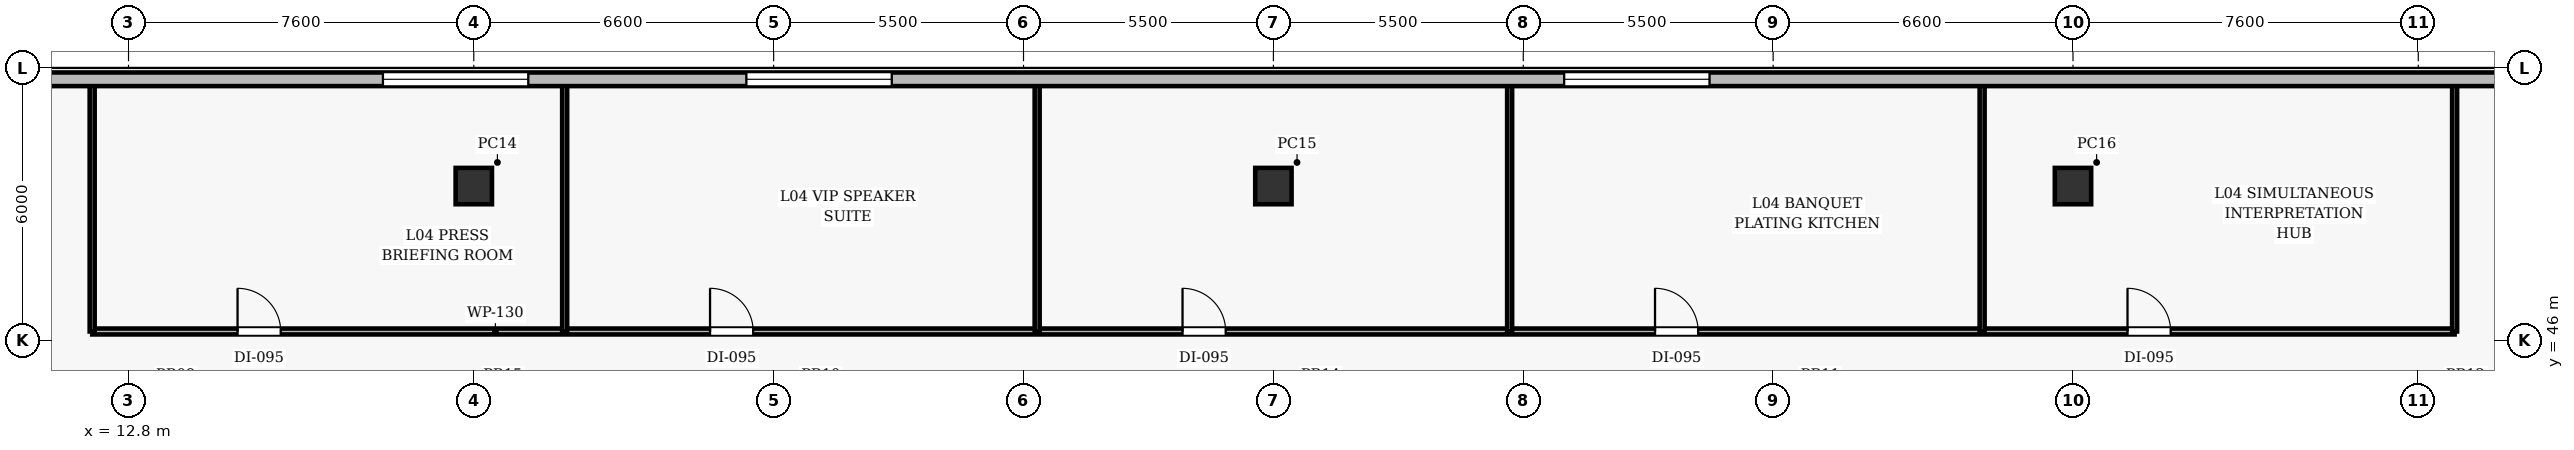
"""IFC4 building model, lengths in metres.
Left out: names, types, materials, properties, quantities, classifications, styles, units other than length and angle.
Written with IfcOpenShell. Run it as: python <this file> out.ifc"""

import sys

from ifc_helpers import new_model, si_unit, direction, frame, frame_2d, origin, origin_2d, place, context, subcontext, project, spatial, rectangle, extrude, element, fill, save


model = new_model("IFC4")
c1 = context("Model", 3, precision=1e-05, world=origin(), true_north=direction((0.0, 1.0)))
c2 = subcontext(c1, "Body", "Model", "MODEL_VIEW")
j1 = project(units=[si_unit("LENGTHUNIT", "METRE"), si_unit("PLANEANGLEUNIT", "RADIAN")], contexts=[c1])
p1 = place(None, origin())
s1 = spatial("IfcSite", under=j1, at=p1, CompositionType="ELEMENT")
p2 = place(p1, origin())
s2 = spatial("IfcBuilding", under=s1, at=p2, CompositionType="ELEMENT")
p3 = place(p2, frame((0.0, 0.0, 24.0)))
s3 = spatial("IfcBuildingStorey", under=s2, at=p3, CompositionType="ELEMENT", Elevation=24.0)
for number, where, z_axis, x_axis in (
    (1, (20.4, 49.4, 0.0), (0.0, 0.0, 1.0), (1.0, 0.0, 0.0)),
    (2, (38.0, 49.4, 0.0), (0.0, 0.0, 1.0), (1.0, 0.0, 0.0)),
    (3, (55.6, 49.4, 0.0), (0.0, 0.0, 1.0), (1.0, 0.0, 0.0)),
):
    element("IfcColumn", number, at=place(p3, frame(where, z_axis=z_axis, x_axis=x_axis)), inside=s3, PredefinedType="COLUMN", context=c2, shape_type="SweptSolid", body=[
        extrude(rectangle(XDim=0.8, YDim=0.8, at=origin_2d()), origin(), (0.0, 0.0, 1.0), 6.0),
    ])
p4 = place(p3, frame((12.0, 46.2, 0.0), z_axis=(0.0, 0.0, 1.0), x_axis=(1.0, 0.0, 0.0)))
e4 = element("IfcWall", 4, at=p4, inside=s3, PredefinedType="PARTITIONING", context=c2, shape_type="SweptSolid", body=[
    extrude(rectangle(XDim=52.0, YDim=0.13, at=frame_2d((26.0, 0.0))), origin(), (0.0, 0.0, 1.0), 4.71),
])
p5 = place(p4, frame((3.2, 0.0, 0.0)))
e5 = element("IfcOpeningElement", 5, at=p5, cuts=e4, PredefinedType="OPENING", context=c2, shape_type="SweptSolid", body=[
    extrude(rectangle(XDim=0.95, YDim=2.15, at=frame_2d((0.475, 1.075))), frame((0.0, 0.075, 0.0), z_axis=(0.0, -1.0, 0.0), x_axis=(1.0, 0.0, 0.0)), (0.0, 0.0, 1.0), 0.15),
])
p6 = place(p4, frame((13.6, 0.0, 0.0)))
e6 = element("IfcOpeningElement", 6, at=p6, cuts=e4, PredefinedType="OPENING", context=c2, shape_type="SweptSolid", body=[
    extrude(rectangle(XDim=0.95, YDim=2.15, at=frame_2d((0.475, 1.075))), frame((0.0, 0.075, 0.0), z_axis=(0.0, -1.0, 0.0), x_axis=(1.0, 0.0, 0.0)), (0.0, 0.0, 1.0), 0.15),
])
p7 = place(p4, frame((24.0, 0.0, 0.0)))
e7 = element("IfcOpeningElement", 7, at=p7, cuts=e4, PredefinedType="OPENING", context=c2, shape_type="SweptSolid", body=[
    extrude(rectangle(XDim=0.95, YDim=2.15, at=frame_2d((0.475, 1.075))), frame((0.0, 0.075, 0.0), z_axis=(0.0, -1.0, 0.0), x_axis=(1.0, 0.0, 0.0)), (0.0, 0.0, 1.0), 0.15),
])
p8 = place(p4, frame((34.4, 0.0, 0.0)))
e8 = element("IfcOpeningElement", 8, at=p8, cuts=e4, PredefinedType="OPENING", context=c2, shape_type="SweptSolid", body=[
    extrude(rectangle(XDim=0.95, YDim=2.15, at=frame_2d((0.475, 1.075))), frame((0.0, 0.075, 0.0), z_axis=(0.0, -1.0, 0.0), x_axis=(1.0, 0.0, 0.0)), (0.0, 0.0, 1.0), 0.15),
])
p9 = place(p4, frame((44.8, 0.0, 0.0)))
e9 = element("IfcOpeningElement", 9, at=p9, cuts=e4, PredefinedType="OPENING", context=c2, shape_type="SweptSolid", body=[
    extrude(rectangle(XDim=0.95, YDim=2.15, at=frame_2d((0.475, 1.075))), frame((0.0, 0.075, 0.0), z_axis=(0.0, -1.0, 0.0), x_axis=(1.0, 0.0, 0.0)), (0.0, 0.0, 1.0), 0.15),
])
for number, where, z_axis, x_axis in (
    (10, (12.0, 46.2, 0.0), (0.0, 0.0, 1.0), (0.0, 1.0, 0.0)),
    (11, (22.4, 46.2, 0.0), (0.0, 0.0, 1.0), (0.0, 1.0, 0.0)),
    (12, (32.8, 46.2, 0.0), (0.0, 0.0, 1.0), (0.0, 1.0, 0.0)),
    (13, (43.2, 46.2, 0.0), (0.0, 0.0, 1.0), (0.0, 1.0, 0.0)),
    (14, (53.6, 46.2, 0.0), (0.0, 0.0, 1.0), (0.0, 1.0, 0.0)),
    (15, (64.0, 46.2, 0.0), (0.0, 0.0, 1.0), (0.0, 1.0, 0.0)),
):
    element("IfcWall", number, at=place(p3, frame(where, z_axis=z_axis, x_axis=x_axis)), inside=s3, PredefinedType="PARTITIONING", context=c2, shape_type="SweptSolid", body=[
        extrude(rectangle(XDim=5.66, YDim=0.11, at=frame_2d((2.83, 0.0))), origin(), (0.0, 0.0, 1.0), 4.71),
    ])
p10 = place(p3, frame((0.4, 51.75, 0.0), z_axis=(0.0, 0.0, 1.0), x_axis=(1.0, 0.0, 0.0)))
e16 = element("IfcWall", 16, at=p10, inside=s3, PredefinedType="SOLIDWALL", context=c2, shape_type="SweptSolid", body=[
    extrude(rectangle(XDim=75.2, YDim=0.3, at=frame_2d((37.6, 0.0))), origin(), (0.0, 0.0, 1.0), 5.16),
])
p11 = place(p10, frame((18.0, 0.0, 0.95)))
e17 = element("IfcOpeningElement", 17, at=p11, cuts=e16, PredefinedType="OPENING", context=c2, shape_type="SweptSolid", body=[
    extrude(rectangle(XDim=3.2, YDim=2.6, at=frame_2d((1.6, 1.3))), frame((0.0, 0.16, 0.0), z_axis=(0.0, -1.0, 0.0), x_axis=(1.0, 0.0, 0.0)), (0.0, 0.0, 1.0), 0.32),
])
p12 = place(p10, frame((26.0, 0.0, 0.95)))
e18 = element("IfcOpeningElement", 18, at=p12, cuts=e16, PredefinedType="OPENING", context=c2, shape_type="SweptSolid", body=[
    extrude(rectangle(XDim=3.2, YDim=2.6, at=frame_2d((1.6, 1.3))), frame((0.0, 0.16, 0.0), z_axis=(0.0, -1.0, 0.0), x_axis=(1.0, 0.0, 0.0)), (0.0, 0.0, 1.0), 0.32),
])
p13 = place(p10, frame((44.0, 0.0, 0.95)))
e19 = element("IfcOpeningElement", 19, at=p13, cuts=e16, PredefinedType="OPENING", context=c2, shape_type="SweptSolid", body=[
    extrude(rectangle(XDim=3.2, YDim=2.6, at=frame_2d((1.6, 1.3))), frame((0.0, 0.16, 0.0), z_axis=(0.0, -1.0, 0.0), x_axis=(1.0, 0.0, 0.0)), (0.0, 0.0, 1.0), 0.32),
])
p14 = place(p5, origin())
e20 = element("IfcDoor", 20, at=p14, inside=s3, OperationType="SINGLE_SWING_LEFT", PredefinedType="DOOR", context=c2, shape_type="SweptSolid", body=[
    extrude(rectangle(XDim=0.95, YDim=2.15, at=frame_2d((0.475, 1.075))), frame((0.0, 0.025, 0.0), z_axis=(0.0, -1.0, 0.0), x_axis=(1.0, 0.0, 0.0)), (0.0, 0.0, 1.0), 0.05),
])
fill(e5, e20)
p15 = place(p6, origin())
e21 = element("IfcDoor", 21, at=p15, inside=s3, OperationType="SINGLE_SWING_LEFT", PredefinedType="DOOR", context=c2, shape_type="SweptSolid", body=[
    extrude(rectangle(XDim=0.95, YDim=2.15, at=frame_2d((0.475, 1.075))), frame((0.0, 0.025, 0.0), z_axis=(0.0, -1.0, 0.0), x_axis=(1.0, 0.0, 0.0)), (0.0, 0.0, 1.0), 0.05),
])
fill(e6, e21)
p16 = place(p7, origin())
e22 = element("IfcDoor", 22, at=p16, inside=s3, OperationType="SINGLE_SWING_LEFT", PredefinedType="DOOR", context=c2, shape_type="SweptSolid", body=[
    extrude(rectangle(XDim=0.95, YDim=2.15, at=frame_2d((0.475, 1.075))), frame((0.0, 0.025, 0.0), z_axis=(0.0, -1.0, 0.0), x_axis=(1.0, 0.0, 0.0)), (0.0, 0.0, 1.0), 0.05),
])
fill(e7, e22)
p17 = place(p8, origin())
e23 = element("IfcDoor", 23, at=p17, inside=s3, OperationType="SINGLE_SWING_LEFT", PredefinedType="DOOR", context=c2, shape_type="SweptSolid", body=[
    extrude(rectangle(XDim=0.95, YDim=2.15, at=frame_2d((0.475, 1.075))), frame((0.0, 0.025, 0.0), z_axis=(0.0, -1.0, 0.0), x_axis=(1.0, 0.0, 0.0)), (0.0, 0.0, 1.0), 0.05),
])
fill(e8, e23)
p18 = place(p9, origin())
e24 = element("IfcDoor", 24, at=p18, inside=s3, OperationType="SINGLE_SWING_LEFT", PredefinedType="DOOR", context=c2, shape_type="SweptSolid", body=[
    extrude(rectangle(XDim=0.95, YDim=2.15, at=frame_2d((0.475, 1.075))), frame((0.0, 0.025, 0.0), z_axis=(0.0, -1.0, 0.0), x_axis=(1.0, 0.0, 0.0)), (0.0, 0.0, 1.0), 0.05),
])
fill(e9, e24)
p19 = place(p11, origin())
e25 = element("IfcWindow", 25, at=p19, inside=s3, PartitioningType="SINGLE_PANEL", PredefinedType="WINDOW", context=c2, shape_type="SweptSolid", body=[
    extrude(rectangle(XDim=3.2, YDim=2.6, at=frame_2d((1.6, 1.3))), frame((0.0, 0.03, 0.0), z_axis=(0.0, -1.0, 0.0), x_axis=(1.0, 0.0, 0.0)), (0.0, 0.0, 1.0), 0.06),
])
fill(e17, e25)
p20 = place(p12, origin())
e26 = element("IfcWindow", 26, at=p20, inside=s3, PartitioningType="SINGLE_PANEL", PredefinedType="WINDOW", context=c2, shape_type="SweptSolid", body=[
    extrude(rectangle(XDim=3.2, YDim=2.6, at=frame_2d((1.6, 1.3))), frame((0.0, 0.03, 0.0), z_axis=(0.0, -1.0, 0.0), x_axis=(1.0, 0.0, 0.0)), (0.0, 0.0, 1.0), 0.06),
])
fill(e18, e26)
p21 = place(p13, origin())
e27 = element("IfcWindow", 27, at=p21, inside=s3, PartitioningType="SINGLE_PANEL", PredefinedType="WINDOW", context=c2, shape_type="SweptSolid", body=[
    extrude(rectangle(XDim=3.2, YDim=2.6, at=frame_2d((1.6, 1.3))), frame((0.0, 0.03, 0.0), z_axis=(0.0, -1.0, 0.0), x_axis=(1.0, 0.0, 0.0)), (0.0, 0.0, 1.0), 0.06),
])
fill(e19, e27)
save(model, sys.argv[1])
